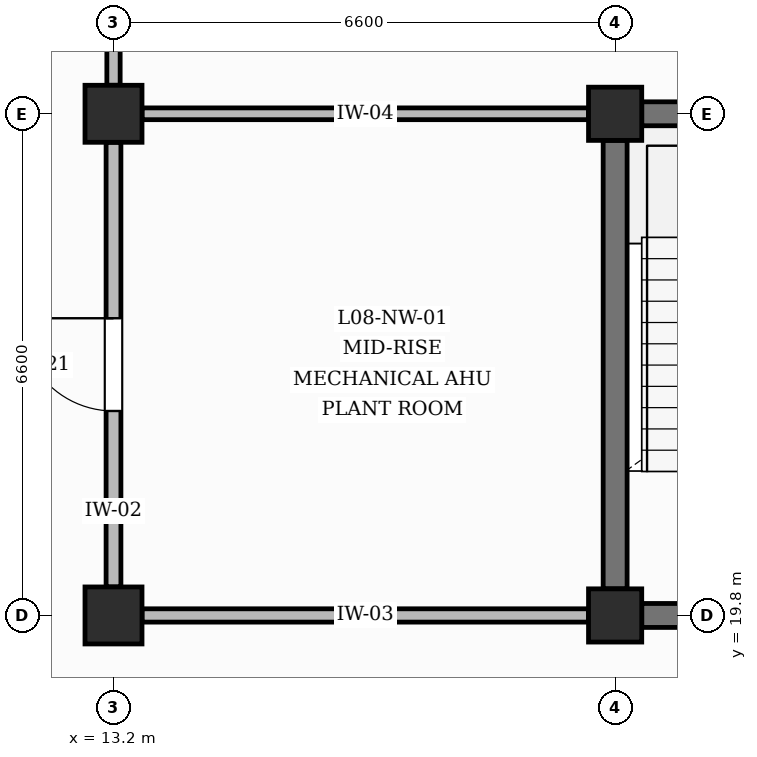
"""IFC4 building model, lengths in metres.
Left out: names, types, materials, properties, quantities, classifications, styles, units other than length and angle.
Written with IfcOpenShell. Run it as: python <this file> out.ifc"""

import sys

from ifc_helpers import new_model, si_unit, direction, frame, frame_2d, origin, origin_2d, place, context, subcontext, project, spatial, rectangle, extrude, element, fill, save


model = new_model("IFC4")
c1 = context("Model", 3, precision=1e-05, world=origin(), true_north=direction((0.0, 1.0)))
c2 = subcontext(c1, "Body", "Model", "MODEL_VIEW")
j1 = project(units=[si_unit("LENGTHUNIT", "METRE"), si_unit("PLANEANGLEUNIT", "RADIAN")], contexts=[c1])
p1 = place(None, origin())
s1 = spatial("IfcSite", under=j1, at=p1, CompositionType="ELEMENT")
p2 = place(p1, origin())
s2 = spatial("IfcBuilding", under=s1, at=p2, CompositionType="ELEMENT")
p3 = place(p2, frame((0.0, 0.0, 35.4)))
s3 = spatial("IfcBuildingStorey", under=s2, at=p3, CompositionType="ELEMENT", Elevation=35.4)
for number, where, z_axis, x_axis in (
    (1, (13.2, 19.8, 0.0), (0.0, 0.0, 1.0), (1.0, 0.0, 0.0)),
    (2, (13.2, 26.4, 0.0), (0.0, 0.0, 1.0), (1.0, 0.0, 0.0)),
):
    element("IfcColumn", number, at=place(p3, frame(where, z_axis=z_axis, x_axis=x_axis)), inside=s3, PredefinedType="COLUMN", context=c2, shape_type="SweptSolid", body=[
        extrude(rectangle(XDim=0.75, YDim=0.75, at=origin_2d()), origin(), (0.0, 0.0, 1.0), 4.2),
    ])
for number, where, z_axis, x_axis in (
    (3, (19.8, 19.8, 0.0), (0.0, 0.0, 1.0), (1.0, 0.0, 0.0)),
    (4, (19.8, 26.4, 0.0), (0.0, 0.0, 1.0), (1.0, 0.0, 0.0)),
):
    element("IfcColumn", number, at=place(p3, frame(where, z_axis=z_axis, x_axis=x_axis)), inside=s3, PredefinedType="COLUMN", context=c2, shape_type="SweptSolid", body=[
        extrude(rectangle(XDim=0.7, YDim=0.7, at=origin_2d()), origin(), (0.0, 0.0, 1.0), 4.2),
    ])
p4 = place(p3, frame((20.15, 19.8, 0.0), z_axis=(0.0, 0.0, 1.0), x_axis=(1.0, 0.0, 0.0)))
e5 = element("IfcWall", 5, at=p4, inside=s3, PredefinedType="SHEAR", context=c2, shape_type="SweptSolid", body=[
    extrude(rectangle(XDim=5.9, YDim=0.315, at=frame_2d((2.95, 0.0))), origin(), (0.0, 0.0, 1.0), 3.18),
])
p5 = place(p4, frame((2.375, 0.0, 0.0)))
e6 = element("IfcOpeningElement", 6, at=p5, cuts=e5, PredefinedType="OPENING", context=c2, shape_type="SweptSolid", body=[
    extrude(rectangle(XDim=1.15, YDim=2.2, at=frame_2d((0.575, 1.1))), frame((0.0, 0.167, 0.0), z_axis=(0.0, -1.0, 0.0), x_axis=(1.0, 0.0, 0.0)), (0.0, 0.0, 1.0), 0.335),
])
for number, where, z_axis, x_axis in (
    (7, (20.15, 26.4, 0.0), (0.0, 0.0, 1.0), (1.0, 0.0, 0.0)),
    (8, (19.8, 20.15, 0.0), (0.0, 0.0, 1.0), (0.0, 1.0, 0.0)),
):
    element("IfcWall", number, at=place(p3, frame(where, z_axis=z_axis, x_axis=x_axis)), inside=s3, PredefinedType="SHEAR", context=c2, shape_type="SweptSolid", body=[
        extrude(rectangle(XDim=5.9, YDim=0.315, at=frame_2d((2.95, 0.0))), origin(), (0.0, 0.0, 1.0), 3.18),
    ])
p6 = place(p3, frame((13.2, 20.175, 0.0), z_axis=(0.0, 0.0, 1.0), x_axis=(0.0, 1.0, 0.0)))
e9 = element("IfcWall", 9, at=p6, inside=s3, PredefinedType="PARTITIONING", context=c2, shape_type="SweptSolid", body=[
    extrude(rectangle(XDim=5.85, YDim=0.195, at=frame_2d((2.925, 0.0))), origin(), (0.0, 0.0, 1.0), 3.18),
])
p7 = place(p6, frame((2.315, 0.0, 0.0)))
e10 = element("IfcOpeningElement", 10, at=p7, cuts=e9, PredefinedType="OPENING", context=c2, shape_type="SweptSolid", body=[
    extrude(rectangle(XDim=1.22, YDim=2.15, at=frame_2d((0.61, 1.075))), frame((0.0, 0.107, 0.0), z_axis=(0.0, -1.0, 0.0), x_axis=(1.0, 0.0, 0.0)), (0.0, 0.0, 1.0), 0.215),
])
p8 = place(p3, frame((13.2, 26.775, 0.0), z_axis=(0.0, 0.0, 1.0), x_axis=(0.0, 1.0, 0.0)))
e11 = element("IfcWall", 11, at=p8, inside=s3, PredefinedType="PARTITIONING", context=c2, shape_type="SweptSolid", body=[
    extrude(rectangle(XDim=5.875, YDim=0.175, at=frame_2d((2.938, 0.0))), origin(), (0.0, 0.0, 1.0), 3.18),
])
p9 = place(p8, frame((2.275, 0.0, 0.0)))
e12 = element("IfcOpeningElement", 12, at=p9, cuts=e11, PredefinedType="OPENING", context=c2, shape_type="SweptSolid", body=[
    extrude(rectangle(XDim=1.3, YDim=2.3, at=frame_2d((0.65, 1.15))), frame((0.0, 0.097, 0.0), z_axis=(0.0, -1.0, 0.0), x_axis=(1.0, 0.0, 0.0)), (0.0, 0.0, 1.0), 0.195),
])
p10 = place(p3, frame((13.575, 19.8, 0.0), z_axis=(0.0, 0.0, 1.0), x_axis=(1.0, 0.0, 0.0)))
e13 = element("IfcWall", 13, at=p10, inside=s3, PredefinedType="PARTITIONING", context=c2, shape_type="SweptSolid", body=[
    extrude(rectangle(XDim=5.875, YDim=0.175, at=frame_2d((2.938, 0.0))), origin(), (0.0, 0.0, 1.0), 3.18),
])
p11 = place(p3, frame((13.575, 26.4, 0.0), z_axis=(0.0, 0.0, 1.0), x_axis=(1.0, 0.0, 0.0)))
e14 = element("IfcWall", 14, at=p11, inside=s3, PredefinedType="PARTITIONING", context=c2, shape_type="SweptSolid", body=[
    extrude(rectangle(XDim=5.875, YDim=0.155, at=frame_2d((2.938, 0.0))), origin(), (0.0, 0.0, 1.0), 3.18),
])
p12 = place(p7, origin())
e15 = element("IfcDoor", 15, at=p12, inside=s3, OperationType="SINGLE_SWING_RIGHT", PredefinedType="DOOR", context=c2, shape_type="SweptSolid", body=[
    extrude(rectangle(XDim=1.22, YDim=2.15, at=frame_2d((0.61, 1.075))), frame((0.0, 0.025, 0.0), z_axis=(0.0, -1.0, 0.0), x_axis=(1.0, 0.0, 0.0)), (0.0, 0.0, 1.0), 0.05),
])
fill(e10, e15)
save(model, sys.argv[1])
